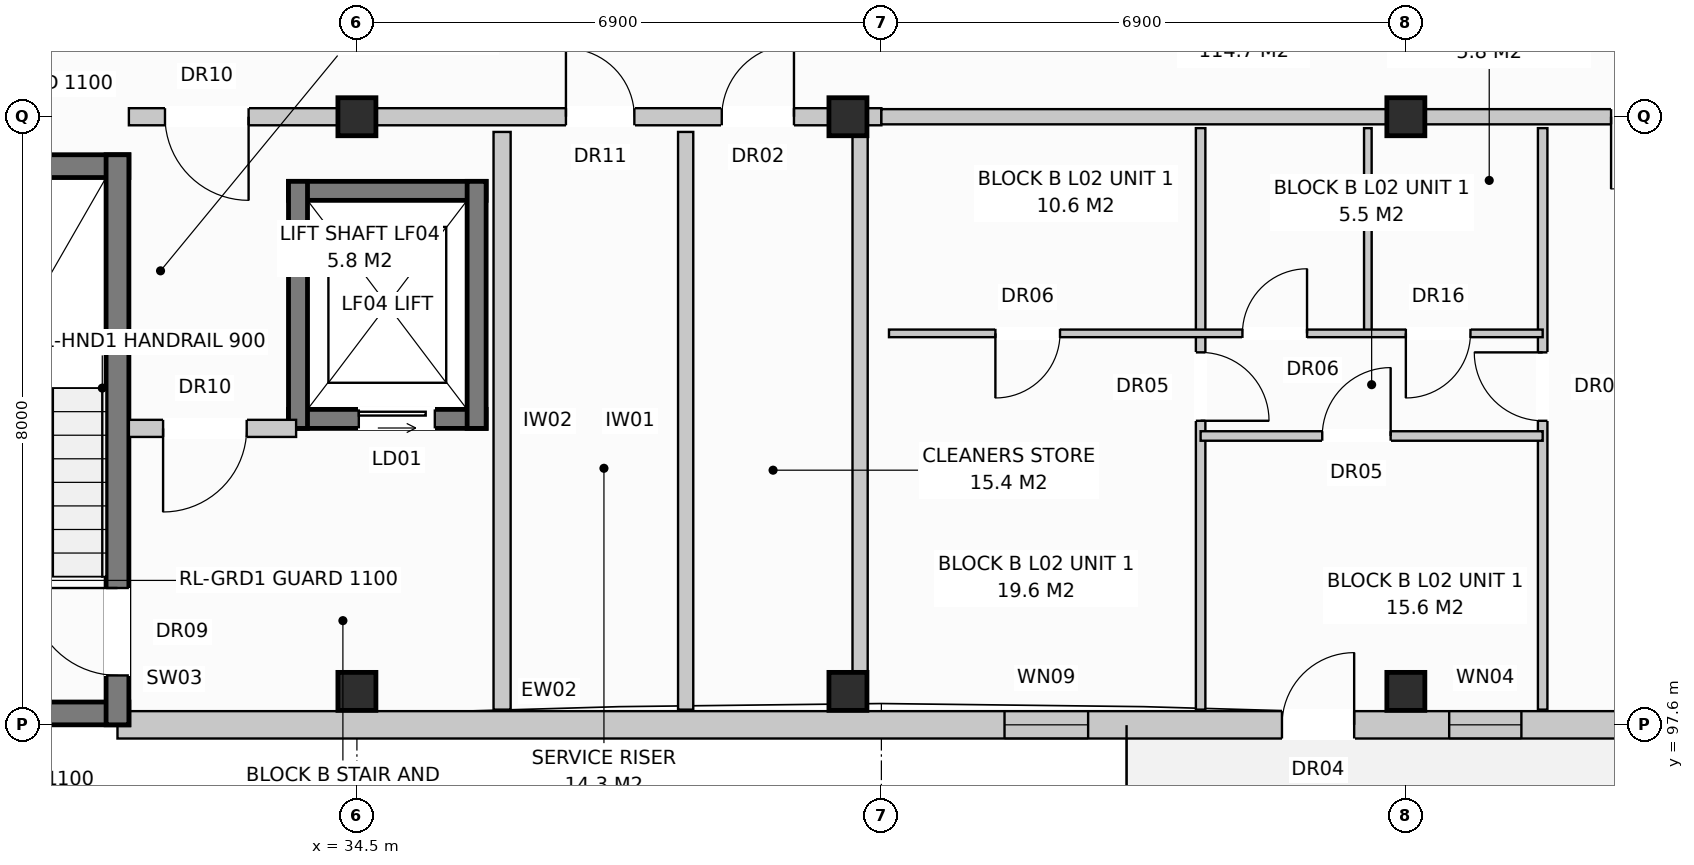
"""IFC4 building model, lengths in metres.
Left out: names, types, materials, properties, quantities, classifications, styles, units other than length and angle.
Written with IfcOpenShell. Run it as: python <this file> out.ifc"""

import sys

from ifc_helpers import new_model, si_unit, direction, frame, frame_2d, origin, origin_with_axes, origin_2d, place, context, subcontext, project, spatial, rectangle, extrude, element, fill, save


model = new_model("IFC4")
c1 = context("Model", 3, precision=1e-05, world=origin(), true_north=direction((0.0, 1.0)))
c2 = subcontext(c1, "Body", "Model", "MODEL_VIEW")
j1 = project(units=[si_unit("LENGTHUNIT", "METRE"), si_unit("PLANEANGLEUNIT", "RADIAN")], contexts=[c1])
p1 = place(None, origin())
s1 = spatial("IfcSite", under=j1, at=p1, CompositionType="ELEMENT")
p2 = place(p1, origin())
s2 = spatial("IfcBuilding", under=s1, at=p2, CompositionType="ELEMENT")
p3 = place(p2, frame((0.0, 0.0, 8.0)))
s3 = spatial("IfcBuildingStorey", under=s2, at=p3, CompositionType="ELEMENT", Elevation=8.0)
for number, where, z_axis, x_axis in (
    (1, (34.5, 98.04, 0.0), (0.0, 0.0, 1.0), (1.0, 0.0, 0.0)),
    (2, (34.5, 105.6, 0.0), (0.0, 0.0, 1.0), (1.0, 0.0, 0.0)),
    (3, (40.96, 98.04, 0.0), (0.0, 0.0, 1.0), (1.0, 0.0, 0.0)),
    (4, (40.96, 105.6, 0.0), (0.0, 0.0, 1.0), (1.0, 0.0, 0.0)),
    (5, (48.3, 98.04, 0.0), (0.0, 0.0, 1.0), (1.0, 0.0, 0.0)),
    (6, (48.3, 105.6, 0.0), (0.0, 0.0, 1.0), (1.0, 0.0, 0.0)),
):
    element("IfcColumn", number, at=place(p3, frame(where, z_axis=z_axis, x_axis=x_axis)), inside=s3, PredefinedType="COLUMN", context=c2, shape_type="SweptSolid", body=[
        extrude(rectangle(XDim=0.5, YDim=0.5, at=origin_2d()), origin(), (0.0, 0.0, 1.0), 3.2),
    ])
p4 = place(p3, frame((31.35, 97.6, 0.0), z_axis=(0.0, 0.0, 1.0), x_axis=(1.0, 0.0, 0.0)))
e7 = element("IfcWall", 7, at=p4, inside=s3, PredefinedType="STANDARD", context=c2, shape_type="SweptSolid", body=[
    extrude(rectangle(XDim=23.68, YDim=0.36, at=frame_2d((11.84, 0.0))), origin(), (0.0, 0.0, 1.0), 2.94),
])
p5 = place(p4, frame((15.32, 0.0, 0.0)))
e8 = element("IfcOpeningElement", 8, at=p5, cuts=e7, PredefinedType="OPENING", context=c2, shape_type="SweptSolid", body=[
    extrude(rectangle(XDim=0.95, YDim=2.1, at=frame_2d((0.475, 1.05))), frame((0.0, 0.192, 0.0), z_axis=(0.0, -1.0, 0.0), x_axis=(1.0, 0.0, 0.0)), (0.0, 0.0, 1.0), 0.384),
])
p6 = place(p4, frame((11.67, 0.0, 0.72)))
e9 = element("IfcOpeningElement", 9, at=p6, cuts=e7, PredefinedType="OPENING", context=c2, shape_type="SweptSolid", body=[
    extrude(rectangle(XDim=1.1, YDim=1.5, at=frame_2d((0.55, 0.75))), frame((0.0, 0.192, 0.0), z_axis=(0.0, -1.0, 0.0), x_axis=(1.0, 0.0, 0.0)), (0.0, 0.0, 1.0), 0.384),
])
p7 = place(p4, frame((17.52, 0.0, 0.9)))
e10 = element("IfcOpeningElement", 10, at=p7, cuts=e7, PredefinedType="OPENING", context=c2, shape_type="SweptSolid", body=[
    extrude(rectangle(XDim=0.95, YDim=1.55, at=frame_2d((0.475, 0.775))), frame((0.0, 0.192, 0.0), z_axis=(0.0, -1.0, 0.0), x_axis=(1.0, 0.0, 0.0)), (0.0, 0.0, 1.0), 0.384),
])
p8 = place(p4, frame((20.67, 0.0, 0.72)))
e11 = element("IfcOpeningElement", 11, at=p8, cuts=e7, PredefinedType="OPENING", context=c2, shape_type="SweptSolid", body=[
    extrude(rectangle(XDim=1.1, YDim=1.5, at=frame_2d((0.55, 0.75))), frame((0.0, 0.192, 0.0), z_axis=(0.0, -1.0, 0.0), x_axis=(1.0, 0.0, 0.0)), (0.0, 0.0, 1.0), 0.384),
])
for number, where, z_axis, x_axis in (
    (12, (27.9, 97.75, 0.0), (0.0, 0.0, 1.0), (1.0, 0.0, 0.0)),
    (13, (27.9, 104.95, 0.0), (0.0, 0.0, 1.0), (1.0, 0.0, 0.0)),
):
    element("IfcWall", number, at=place(p3, frame(where, z_axis=z_axis, x_axis=x_axis)), inside=s3, PredefinedType="SHEAR", context=c2, shape_type="SweptSolid", body=[
        extrude(rectangle(XDim=3.6, YDim=0.3, at=frame_2d((1.8, 0.0))), origin(), (0.0, 0.0, 1.0), 2.94),
    ])
p9 = place(p3, frame((31.35, 97.6, 0.0), z_axis=(0.0, 0.0, 1.0), x_axis=(0.0, 1.0, 0.0)))
e14 = element("IfcWall", 14, at=p9, inside=s3, PredefinedType="SHEAR", context=c2, shape_type="SweptSolid", body=[
    extrude(rectangle(XDim=7.5, YDim=0.3, at=frame_2d((3.75, 0.0))), origin(), (0.0, 0.0, 1.0), 2.94),
])
p10 = place(p9, frame((0.65, 0.0, 0.0)))
e15 = element("IfcOpeningElement", 15, at=p10, cuts=e14, PredefinedType="OPENING", context=c2, shape_type="SweptSolid", body=[
    extrude(rectangle(XDim=1.15, YDim=2.15, at=frame_2d((0.575, 1.075))), frame((0.0, 0.162, 0.0), z_axis=(0.0, -1.0, 0.0), x_axis=(1.0, 0.0, 0.0)), (0.0, 0.0, 1.0), 0.324),
])
p11 = place(p3, frame((33.6, 101.625, 0.0), z_axis=(0.0, 0.0, 1.0), x_axis=(1.0, 0.0, 0.0)))
e16 = element("IfcWall", 16, at=p11, inside=s3, PredefinedType="SHEAR", context=c2, shape_type="SweptSolid", body=[
    extrude(rectangle(XDim=2.6, YDim=0.25, at=frame_2d((1.3, 0.0))), origin(), (0.0, 0.0, 1.0), 2.94),
])
p12 = place(p11, frame((0.925, 0.0, 0.0)))
e17 = element("IfcOpeningElement", 17, at=p12, cuts=e16, PredefinedType="OPENING", context=c2, shape_type="SweptSolid", body=[
    extrude(rectangle(XDim=1.0, YDim=2.1, at=frame_2d((0.5, 1.05))), frame((0.0, 0.137, 0.0), z_axis=(0.0, -1.0, 0.0), x_axis=(1.0, 0.0, 0.0)), (0.0, 0.0, 1.0), 0.274),
])
p13 = place(p3, frame((33.6, 104.625, 0.0), z_axis=(0.0, 0.0, 1.0), x_axis=(1.0, 0.0, 0.0)))
e18 = element("IfcWall", 18, at=p13, inside=s3, PredefinedType="SHEAR", context=c2, shape_type="SweptSolid", body=[
    extrude(rectangle(XDim=2.6, YDim=0.25, at=frame_2d((1.3, 0.0))), origin(), (0.0, 0.0, 1.0), 2.94),
])
for number, where, z_axis, x_axis in (
    (19, (33.725, 101.5, 0.0), (0.0, 0.0, 1.0), (0.0, 1.0, 0.0)),
    (20, (36.075, 101.5, 0.0), (0.0, 0.0, 1.0), (0.0, 1.0, 0.0)),
):
    element("IfcWall", number, at=place(p3, frame(where, z_axis=z_axis, x_axis=x_axis)), inside=s3, PredefinedType="SHEAR", context=c2, shape_type="SweptSolid", body=[
        extrude(rectangle(XDim=3.25, YDim=0.25, at=frame_2d((1.625, 0.0))), origin(), (0.0, 0.0, 1.0), 2.94),
    ])
p14 = place(p3, frame((36.41, 97.8, 0.0), z_axis=(0.0, 0.0, 1.0), x_axis=(0.0, 1.0, 0.0)))
e21 = element("IfcWall", 21, at=p14, inside=s3, PredefinedType="PARTITIONING", context=c2, shape_type="SweptSolid", body=[
    extrude(rectangle(XDim=7.6, YDim=0.225, at=frame_2d((3.8, 0.0))), origin(), (0.0, 0.0, 1.0), 2.59),
])
p15 = place(p3, frame((31.5, 101.5, 0.0), z_axis=(0.0, 0.0, 1.0), x_axis=(1.0, 0.0, 0.0)))
e22 = element("IfcWall", 22, at=p15, inside=s3, PredefinedType="PARTITIONING", context=c2, shape_type="SweptSolid", body=[
    extrude(rectangle(XDim=2.2, YDim=0.225, at=frame_2d((1.1, 0.0))), origin(), (0.0, 0.0, 1.0), 2.94),
])
p16 = place(p15, frame((0.45, 0.0, 0.0)))
e23 = element("IfcOpeningElement", 23, at=p16, cuts=e22, PredefinedType="OPENING", context=c2, shape_type="SweptSolid", body=[
    extrude(rectangle(XDim=1.1, YDim=2.15, at=frame_2d((0.55, 1.075))), frame((0.0, 0.125, 0.0), z_axis=(0.0, -1.0, 0.0), x_axis=(1.0, 0.0, 0.0)), (0.0, 0.0, 1.0), 0.249),
])
for number, where, z_axis, x_axis in (
    (24, (38.825, 97.8, 0.0), (0.0, 0.0, 1.0), (0.0, 1.0, 0.0)),
    (25, (41.12, 97.8, 0.0), (0.0, 0.0, 1.0), (0.0, 1.0, 0.0)),
):
    element("IfcWall", number, at=place(p3, frame(where, z_axis=z_axis, x_axis=x_axis)), inside=s3, PredefinedType="PARTITIONING", context=c2, shape_type="SweptSolid", body=[
        extrude(rectangle(XDim=7.6, YDim=0.2, at=frame_2d((3.8, 0.0))), origin(), (0.0, 0.0, 1.0), 2.94),
    ])
p17 = place(p3, frame((31.5, 105.6, 0.0), z_axis=(0.0, 0.0, 1.0), x_axis=(1.0, 0.0, 0.0)))
e26 = element("IfcWall", 26, at=p17, inside=s3, PredefinedType="PARTITIONING", context=c2, shape_type="SweptSolid", body=[
    extrude(rectangle(XDim=9.9, YDim=0.225, at=frame_2d((4.95, 0.0))), origin(), (0.0, 0.0, 1.0), 2.38),
])
p18 = place(p17, frame((0.475, 0.0, 0.0)))
e27 = element("IfcOpeningElement", 27, at=p18, cuts=e26, PredefinedType="OPENING", context=c2, shape_type="SweptSolid", body=[
    extrude(rectangle(XDim=1.1, YDim=2.15, at=frame_2d((0.55, 1.075))), frame((0.0, 0.125, 0.0), z_axis=(0.0, -1.0, 0.0), x_axis=(1.0, 0.0, 0.0)), (0.0, 0.0, 1.0), 0.249),
])
p19 = place(p17, frame((5.75, 0.0, 0.0)))
e28 = element("IfcOpeningElement", 28, at=p19, cuts=e26, PredefinedType="OPENING", context=c2, shape_type="SweptSolid", body=[
    extrude(rectangle(XDim=0.9, YDim=2.1, at=frame_2d((0.45, 1.05))), frame((0.0, 0.125, 0.0), z_axis=(0.0, -1.0, 0.0), x_axis=(1.0, 0.0, 0.0)), (0.0, 0.0, 1.0), 0.249),
])
p20 = place(p17, frame((7.8, 0.0, 0.0)))
e29 = element("IfcOpeningElement", 29, at=p20, cuts=e26, PredefinedType="OPENING", context=c2, shape_type="SweptSolid", body=[
    extrude(rectangle(XDim=0.95, YDim=2.15, at=frame_2d((0.475, 1.075))), frame((0.0, 0.125, 0.0), z_axis=(0.0, -1.0, 0.0), x_axis=(1.0, 0.0, 0.0)), (0.0, 0.0, 1.0), 0.249),
])
p21 = place(p3, frame((41.4, 105.6, 0.0), z_axis=(0.0, 0.0, 1.0), x_axis=(1.0, 0.0, 0.0)))
e30 = element("IfcWall", 30, at=p21, inside=s3, PredefinedType="PARTITIONING", context=c2, shape_type="SweptSolid", body=[
    extrude(rectangle(XDim=13.8, YDim=0.2, at=frame_2d((6.9, 0.0))), origin(), (0.0, 0.0, 1.0), 2.38),
])
p22 = place(p21, frame((9.6, 0.0, 0.0)))
e31 = element("IfcOpeningElement", 31, at=p22, cuts=e30, PredefinedType="OPENING", context=c2, shape_type="SweptSolid", body=[
    extrude(rectangle(XDim=0.95, YDim=2.15, at=frame_2d((0.475, 1.075))), frame((0.0, 0.112, 0.0), z_axis=(0.0, -1.0, 0.0), x_axis=(1.0, 0.0, 0.0)), (0.0, 0.0, 1.0), 0.224),
])
p23 = place(p3, frame((50.1, 105.45, 0.0), z_axis=(0.0, 0.0, 1.0), x_axis=(0.0, -1.0, 0.0)))
e32 = element("IfcWall", 32, at=p23, inside=s3, PredefinedType="PARTITIONING", context=c2, shape_type="SweptSolid", body=[
    extrude(rectangle(XDim=7.65, YDim=0.125, at=frame_2d((3.825, 0.0))), origin(), (0.0, 0.0, 1.0), 2.94),
])
p24 = place(p23, frame((2.95, 0.0, 0.0)))
e33 = element("IfcOpeningElement", 33, at=p24, cuts=e32, PredefinedType="OPENING", context=c2, shape_type="SweptSolid", body=[
    extrude(rectangle(XDim=0.9, YDim=2.1, at=frame_2d((0.45, 1.05))), frame((0.0, 0.074, 0.0), z_axis=(0.0, -1.0, 0.0), x_axis=(1.0, 0.0, 0.0)), (0.0, 0.0, 1.0), 0.149),
])
p25 = place(p3, frame((45.6, 105.45, 0.0), z_axis=(0.0, 0.0, 1.0), x_axis=(0.0, -1.0, 0.0)))
e34 = element("IfcWall", 34, at=p25, inside=s3, PredefinedType="PARTITIONING", context=c2, shape_type="SweptSolid", body=[
    extrude(rectangle(XDim=7.65, YDim=0.125, at=frame_2d((3.825, 0.0))), origin(), (0.0, 0.0, 1.0), 2.94),
])
p26 = place(p25, frame((2.95, 0.0, 0.0)))
e35 = element("IfcOpeningElement", 35, at=p26, cuts=e34, PredefinedType="OPENING", context=c2, shape_type="SweptSolid", body=[
    extrude(rectangle(XDim=0.9, YDim=2.1, at=frame_2d((0.45, 1.05))), frame((0.0, 0.074, 0.0), z_axis=(0.0, -1.0, 0.0), x_axis=(1.0, 0.0, 0.0)), (0.0, 0.0, 1.0), 0.149),
])
p27 = place(p3, frame((47.8, 105.45, 0.0), z_axis=(0.0, 0.0, 1.0), x_axis=(0.0, -1.0, 0.0)))
e36 = element("IfcWall", 36, at=p27, inside=s3, PredefinedType="PARTITIONING", context=c2, shape_type="SweptSolid", body=[
    extrude(rectangle(XDim=2.7, YDim=0.1, at=frame_2d((1.35, 0.0))), origin(), (0.0, 0.0, 1.0), 2.94),
])
p28 = place(p3, frame((41.5, 102.75, 0.0), z_axis=(0.0, 0.0, 1.0), x_axis=(1.0, 0.0, 0.0)))
e37 = element("IfcWall", 37, at=p28, inside=s3, PredefinedType="PARTITIONING", context=c2, shape_type="SweptSolid", body=[
    extrude(rectangle(XDim=8.6, YDim=0.1, at=frame_2d((4.3, 0.0))), origin(), (0.0, 0.0, 1.0), 2.94),
])
p29 = place(p28, frame((1.4, 0.0, 0.0)))
e38 = element("IfcOpeningElement", 38, at=p29, cuts=e37, PredefinedType="OPENING", context=c2, shape_type="SweptSolid", body=[
    extrude(rectangle(XDim=0.85, YDim=2.05, at=frame_2d((0.425, 1.025))), frame((0.0, 0.062, 0.0), z_axis=(0.0, -1.0, 0.0), x_axis=(1.0, 0.0, 0.0)), (0.0, 0.0, 1.0), 0.124),
])
p30 = place(p28, frame((4.65, 0.0, 0.0)))
e39 = element("IfcOpeningElement", 39, at=p30, cuts=e37, PredefinedType="OPENING", context=c2, shape_type="SweptSolid", body=[
    extrude(rectangle(XDim=0.85, YDim=2.05, at=frame_2d((0.425, 1.025))), frame((0.0, 0.062, 0.0), z_axis=(0.0, -1.0, 0.0), x_axis=(1.0, 0.0, 0.0)), (0.0, 0.0, 1.0), 0.124),
])
p31 = place(p28, frame((6.8, 0.0, 0.0)))
e40 = element("IfcOpeningElement", 40, at=p31, cuts=e37, PredefinedType="OPENING", context=c2, shape_type="SweptSolid", body=[
    extrude(rectangle(XDim=0.85, YDim=2.1, at=frame_2d((0.425, 1.05))), frame((0.0, 0.062, 0.0), z_axis=(0.0, -1.0, 0.0), x_axis=(1.0, 0.0, 0.0)), (0.0, 0.0, 1.0), 0.124),
])
p32 = place(p3, frame((45.6, 101.4, 0.0), z_axis=(0.0, 0.0, 1.0), x_axis=(1.0, 0.0, 0.0)))
e41 = element("IfcWall", 41, at=p32, inside=s3, PredefinedType="PARTITIONING", context=c2, shape_type="SweptSolid", body=[
    extrude(rectangle(XDim=4.5, YDim=0.125, at=frame_2d((2.25, 0.0))), origin(), (0.0, 0.0, 1.0), 2.94),
])
p33 = place(p32, frame((1.6, 0.0, 0.0)))
e42 = element("IfcOpeningElement", 42, at=p33, cuts=e41, PredefinedType="OPENING", context=c2, shape_type="SweptSolid", body=[
    extrude(rectangle(XDim=0.9, YDim=2.1, at=frame_2d((0.45, 1.05))), frame((0.0, 0.074, 0.0), z_axis=(0.0, -1.0, 0.0), x_axis=(1.0, 0.0, 0.0)), (0.0, 0.0, 1.0), 0.149),
])
p34 = place(p5, origin_with_axes())
e43 = element("IfcDoor", 43, at=p34, inside=s3, OperationType="SINGLE_SWING_RIGHT", PredefinedType="DOOR", context=c2, shape_type="SweptSolid", body=[
    extrude(rectangle(XDim=0.95, YDim=2.1, at=frame_2d((0.475, 1.05))), frame((0.0, 0.025, 0.0), z_axis=(0.0, -1.0, 0.0), x_axis=(1.0, 0.0, 0.0)), (0.0, 0.0, 1.0), 0.05),
])
fill(e8, e43)
p35 = place(p6, origin_with_axes())
e44 = element("IfcWindow", 44, at=p35, inside=s3, PartitioningType="SINGLE_PANEL", PredefinedType="WINDOW", context=c2, shape_type="SweptSolid", body=[
    extrude(rectangle(XDim=1.1, YDim=1.5, at=frame_2d((0.55, 0.75))), frame((0.0, 0.03, 0.0), z_axis=(0.0, -1.0, 0.0), x_axis=(1.0, 0.0, 0.0)), (0.0, 0.0, 1.0), 0.06),
])
fill(e9, e44)
p36 = place(p7, origin_with_axes())
e45 = element("IfcWindow", 45, at=p36, inside=s3, PartitioningType="SINGLE_PANEL", PredefinedType="WINDOW", context=c2, shape_type="SweptSolid", body=[
    extrude(rectangle(XDim=0.95, YDim=1.55, at=frame_2d((0.475, 0.775))), frame((0.0, 0.03, 0.0), z_axis=(0.0, -1.0, 0.0), x_axis=(1.0, 0.0, 0.0)), (0.0, 0.0, 1.0), 0.06),
])
fill(e10, e45)
p37 = place(p10, origin_with_axes())
e46 = element("IfcDoor", 46, at=p37, inside=s3, OperationType="SINGLE_SWING_RIGHT", PredefinedType="DOOR", context=c2, shape_type="SweptSolid", body=[
    extrude(rectangle(XDim=1.15, YDim=2.15, at=frame_2d((0.575, 1.075))), frame((0.0, 0.025, 0.0), z_axis=(0.0, -1.0, 0.0), x_axis=(1.0, 0.0, 0.0)), (0.0, 0.0, 1.0), 0.05),
])
fill(e15, e46)
p38 = place(p12, origin_with_axes())
e47 = element("IfcDoor", 47, at=p38, inside=s3, OperationType="SLIDING_TO_LEFT", PredefinedType="DOOR", context=c2, shape_type="SweptSolid", body=[
    extrude(rectangle(XDim=1.0, YDim=2.1, at=frame_2d((0.5, 1.05))), frame((0.0, 0.025, 0.0), z_axis=(0.0, -1.0, 0.0), x_axis=(1.0, 0.0, 0.0)), (0.0, 0.0, 1.0), 0.05),
])
fill(e17, e47)
p39 = place(p16, frame((1.1, 0.0, 0.0), z_axis=(0.0, 0.0, 1.0), x_axis=(-1.0, 0.0, 0.0)))
e48 = element("IfcDoor", 48, at=p39, inside=s3, OperationType="SINGLE_SWING_LEFT", PredefinedType="DOOR", context=c2, shape_type="SweptSolid", body=[
    extrude(rectangle(XDim=1.1, YDim=2.15, at=frame_2d((0.55, 1.075))), frame((0.0, 0.025, 0.0), z_axis=(0.0, -1.0, 0.0), x_axis=(1.0, 0.0, 0.0)), (0.0, 0.0, 1.0), 0.05),
])
fill(e23, e48)
p40 = place(p18, frame((1.1, 0.0, 0.0), z_axis=(0.0, 0.0, 1.0), x_axis=(-1.0, 0.0, 0.0)))
e49 = element("IfcDoor", 49, at=p40, inside=s3, OperationType="SINGLE_SWING_RIGHT", PredefinedType="DOOR", context=c2, shape_type="SweptSolid", body=[
    extrude(rectangle(XDim=1.1, YDim=2.15, at=frame_2d((0.55, 1.075))), frame((0.0, 0.025, 0.0), z_axis=(0.0, -1.0, 0.0), x_axis=(1.0, 0.0, 0.0)), (0.0, 0.0, 1.0), 0.05),
])
fill(e27, e49)
p41 = place(p19, origin_with_axes())
e50 = element("IfcDoor", 50, at=p41, inside=s3, OperationType="SINGLE_SWING_LEFT", PredefinedType="DOOR", context=c2, shape_type="SweptSolid", body=[
    extrude(rectangle(XDim=0.9, YDim=2.1, at=frame_2d((0.45, 1.05))), frame((0.0, 0.025, 0.0), z_axis=(0.0, -1.0, 0.0), x_axis=(1.0, 0.0, 0.0)), (0.0, 0.0, 1.0), 0.05),
])
fill(e28, e50)
p42 = place(p20, origin_with_axes())
e51 = element("IfcDoor", 51, at=p42, inside=s3, OperationType="SINGLE_SWING_RIGHT", PredefinedType="DOOR", context=c2, shape_type="SweptSolid", body=[
    extrude(rectangle(XDim=0.95, YDim=2.15, at=frame_2d((0.475, 1.075))), frame((0.0, 0.025, 0.0), z_axis=(0.0, -1.0, 0.0), x_axis=(1.0, 0.0, 0.0)), (0.0, 0.0, 1.0), 0.05),
])
fill(e29, e51)
p43 = place(p22, frame((0.95, 0.0, 0.0), z_axis=(0.0, 0.0, 1.0), x_axis=(-1.0, 0.0, 0.0)))
e52 = element("IfcDoor", 52, at=p43, inside=s3, OperationType="SINGLE_SWING_LEFT", PredefinedType="DOOR", context=c2, shape_type="SweptSolid", body=[
    extrude(rectangle(XDim=0.95, YDim=2.15, at=frame_2d((0.475, 1.075))), frame((0.0, 0.025, 0.0), z_axis=(0.0, -1.0, 0.0), x_axis=(1.0, 0.0, 0.0)), (0.0, 0.0, 1.0), 0.05),
])
fill(e31, e52)
p44 = place(p24, frame((0.9, 0.0, 0.0), z_axis=(0.0, 0.0, 1.0), x_axis=(-1.0, 0.0, 0.0)))
e53 = element("IfcDoor", 53, at=p44, inside=s3, OperationType="SINGLE_SWING_LEFT", PredefinedType="DOOR", context=c2, shape_type="SweptSolid", body=[
    extrude(rectangle(XDim=0.9, YDim=2.1, at=frame_2d((0.45, 1.05))), frame((0.0, 0.025, 0.0), z_axis=(0.0, -1.0, 0.0), x_axis=(1.0, 0.0, 0.0)), (0.0, 0.0, 1.0), 0.05),
])
fill(e33, e53)
p45 = place(p26, origin_with_axes())
e54 = element("IfcDoor", 54, at=p45, inside=s3, OperationType="SINGLE_SWING_RIGHT", PredefinedType="DOOR", context=c2, shape_type="SweptSolid", body=[
    extrude(rectangle(XDim=0.9, YDim=2.1, at=frame_2d((0.45, 1.05))), frame((0.0, 0.025, 0.0), z_axis=(0.0, -1.0, 0.0), x_axis=(1.0, 0.0, 0.0)), (0.0, 0.0, 1.0), 0.05),
])
fill(e35, e54)
p46 = place(p29, frame((0.85, 0.0, 0.0), z_axis=(0.0, 0.0, 1.0), x_axis=(-1.0, 0.0, 0.0)))
e55 = element("IfcDoor", 55, at=p46, inside=s3, OperationType="SINGLE_SWING_LEFT", PredefinedType="DOOR", context=c2, shape_type="SweptSolid", body=[
    extrude(rectangle(XDim=0.85, YDim=2.05, at=frame_2d((0.425, 1.025))), frame((0.0, 0.025, 0.0), z_axis=(0.0, -1.0, 0.0), x_axis=(1.0, 0.0, 0.0)), (0.0, 0.0, 1.0), 0.05),
])
fill(e38, e55)
p47 = place(p30, origin_with_axes())
e56 = element("IfcDoor", 56, at=p47, inside=s3, OperationType="SINGLE_SWING_RIGHT", PredefinedType="DOOR", context=c2, shape_type="SweptSolid", body=[
    extrude(rectangle(XDim=0.85, YDim=2.05, at=frame_2d((0.425, 1.025))), frame((0.0, 0.025, 0.0), z_axis=(0.0, -1.0, 0.0), x_axis=(1.0, 0.0, 0.0)), (0.0, 0.0, 1.0), 0.05),
])
fill(e39, e56)
p48 = place(p31, frame((0.85, 0.0, 0.0), z_axis=(0.0, 0.0, 1.0), x_axis=(-1.0, 0.0, 0.0)))
e57 = element("IfcDoor", 57, at=p48, inside=s3, OperationType="SINGLE_SWING_LEFT", PredefinedType="DOOR", context=c2, shape_type="SweptSolid", body=[
    extrude(rectangle(XDim=0.85, YDim=2.1, at=frame_2d((0.425, 1.05))), frame((0.0, 0.025, 0.0), z_axis=(0.0, -1.0, 0.0), x_axis=(1.0, 0.0, 0.0)), (0.0, 0.0, 1.0), 0.05),
])
fill(e40, e57)
p49 = place(p33, origin_with_axes())
e58 = element("IfcDoor", 58, at=p49, inside=s3, OperationType="SINGLE_SWING_RIGHT", PredefinedType="DOOR", context=c2, shape_type="SweptSolid", body=[
    extrude(rectangle(XDim=0.9, YDim=2.1, at=frame_2d((0.45, 1.05))), frame((0.0, 0.025, 0.0), z_axis=(0.0, -1.0, 0.0), x_axis=(1.0, 0.0, 0.0)), (0.0, 0.0, 1.0), 0.05),
])
fill(e42, e58)
save(model, sys.argv[1])
